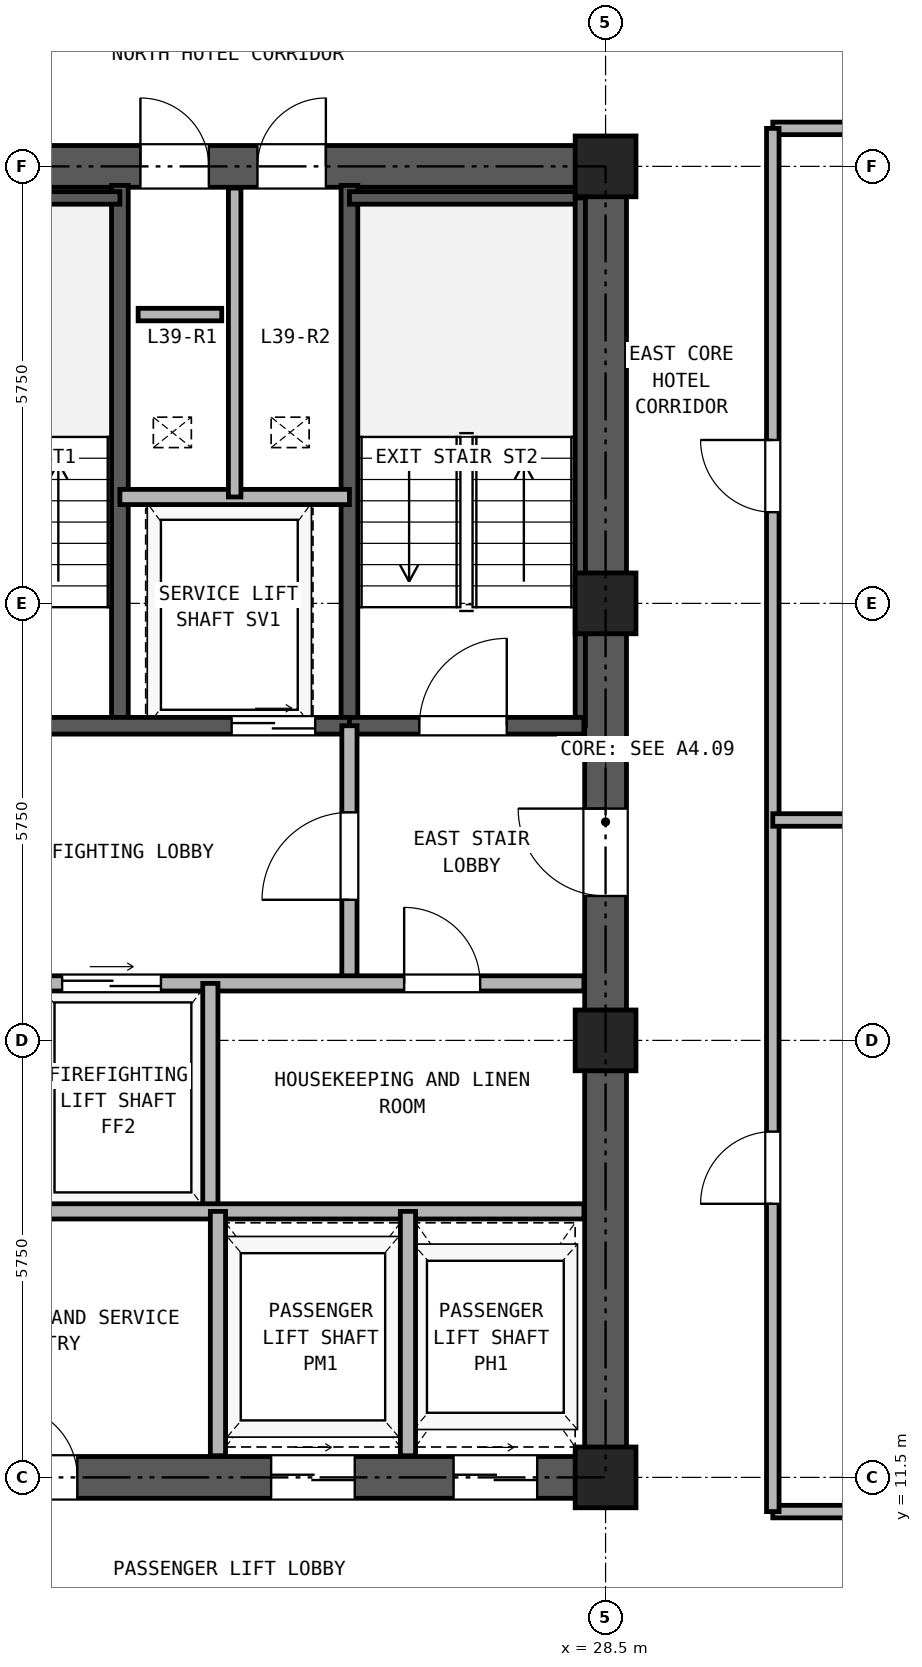
"""IFC4 building model, lengths in metres.
Left out: names, types, materials, properties, quantities, classifications, styles, units other than length and angle.
Written with IfcOpenShell. Run it as: python <this file> out.ifc"""

import sys

from ifc_helpers import new_model, si_unit, direction, frame, frame_2d, origin, origin_2d, place, context, subcontext, project, spatial, rectangle, hollow_rectangle, extrude, source, transform, mapped, element, fill, save


model = new_model("IFC4")
c1 = context("Model", 3, precision=1e-05, world=origin(), true_north=direction((0.0, 1.0)))
c2 = subcontext(c1, "Body", "Model", "MODEL_VIEW")
j1 = project(units=[si_unit("LENGTHUNIT", "METRE"), si_unit("PLANEANGLEUNIT", "RADIAN")], contexts=[c1])
p1 = place(None, origin())
s1 = spatial("IfcSite", under=j1, at=p1, CompositionType="ELEMENT")
p2 = place(p1, origin())
s2 = spatial("IfcBuilding", under=s1, at=p2, CompositionType="ELEMENT")
p3 = place(p2, frame((0.0, 0.0, 140.7)))
s3 = spatial("IfcBuildingStorey", under=s2, at=p3, CompositionType="ELEMENT", Elevation=140.7)
m1 = source(origin(), c2, "Body", "SweptSolid", [
    extrude(hollow_rectangle(XDim=0.8, YDim=0.8, WallThickness=0.045, at=origin_2d()), origin(), (0.0, 0.0, 1.0), 2.84),
])
for number, where, z_axis, x_axis in (
    (1, (28.5, 11.5, 0.0), (0.0, 0.0, 1.0), (1.0, 0.0, 0.0)),
    (2, (28.5, 17.25, 0.0), (0.0, 0.0, 1.0), (1.0, 0.0, 0.0)),
    (3, (28.5, 23.0, 0.0), (0.0, 0.0, 1.0), (1.0, 0.0, 0.0)),
    (4, (28.5, 28.75, 0.0), (0.0, 0.0, 1.0), (1.0, 0.0, 0.0)),
):
    element("IfcColumn", number, at=place(p3, frame(where, z_axis=z_axis, x_axis=x_axis)), inside=s3, PredefinedType="COLUMN", context=c2, shape_type="MappedRepresentation", body=[
        mapped(m1, transform((0.0, 0.0, 0.0), x_axis=(1.0, 0.0, 0.0), y_axis=(0.0, 1.0, 0.0), z_axis=(0.0, 0.0, 1.0), scale=1.0)),
    ])
p4 = place(p3, frame((18.225, 11.5, 0.0), z_axis=(0.0, 0.0, 1.0), x_axis=(1.0, 0.0, 0.0)))
e5 = element("IfcWall", 5, at=p4, inside=s3, PredefinedType="SHEAR", context=c2, shape_type="SweptSolid", body=[
    extrude(rectangle(XDim=10.55, YDim=0.55, at=frame_2d((5.275, 0.0))), origin(), (0.0, 0.0, 1.0), 2.84),
])
p5 = place(p4, frame((2.375, 0.0, 0.0)))
e6 = element("IfcOpeningElement", 6, at=p5, cuts=e5, PredefinedType="OPENING", context=c2, shape_type="SweptSolid", body=[
    extrude(rectangle(XDim=0.95, YDim=2.15, at=frame_2d((0.475, 1.075))), frame((0.0, 0.285, 0.0), z_axis=(0.0, -1.0, 0.0), x_axis=(1.0, 0.0, 0.0)), (0.0, 0.0, 1.0), 0.57),
])
p6 = place(p4, frame((5.875, 0.0, 0.0)))
e7 = element("IfcOpeningElement", 7, at=p6, cuts=e5, PredefinedType="OPENING", context=c2, shape_type="SweptSolid", body=[
    extrude(rectangle(XDim=1.1, YDim=2.25, at=frame_2d((0.55, 1.125))), frame((0.0, 0.285, 0.0), z_axis=(0.0, -1.0, 0.0), x_axis=(1.0, 0.0, 0.0)), (0.0, 0.0, 1.0), 0.57),
])
p7 = place(p4, frame((8.275, 0.0, 0.0)))
e8 = element("IfcOpeningElement", 8, at=p7, cuts=e5, PredefinedType="OPENING", context=c2, shape_type="SweptSolid", body=[
    extrude(rectangle(XDim=1.1, YDim=2.25, at=frame_2d((0.55, 1.125))), frame((0.0, 0.285, 0.0), z_axis=(0.0, -1.0, 0.0), x_axis=(1.0, 0.0, 0.0)), (0.0, 0.0, 1.0), 0.57),
])
p8 = place(p3, frame((18.225, 28.75, 0.0), z_axis=(0.0, 0.0, 1.0), x_axis=(1.0, 0.0, 0.0)))
e9 = element("IfcWall", 9, at=p8, inside=s3, PredefinedType="SHEAR", context=c2, shape_type="SweptSolid", body=[
    extrude(rectangle(XDim=10.55, YDim=0.55, at=frame_2d((5.275, 0.0))), origin(), (0.0, 0.0, 1.0), 2.84),
])
p9 = place(p8, frame((4.155, 0.0, 0.0)))
e10 = element("IfcOpeningElement", 10, at=p9, cuts=e9, PredefinedType="OPENING", context=c2, shape_type="SweptSolid", body=[
    extrude(rectangle(XDim=0.9, YDim=2.05, at=frame_2d((0.45, 1.025))), frame((0.0, 0.285, 0.0), z_axis=(0.0, -1.0, 0.0), x_axis=(1.0, 0.0, 0.0)), (0.0, 0.0, 1.0), 0.57),
])
p10 = place(p8, frame((5.695, 0.0, 0.0)))
e11 = element("IfcOpeningElement", 11, at=p10, cuts=e9, PredefinedType="OPENING", context=c2, shape_type="SweptSolid", body=[
    extrude(rectangle(XDim=0.9, YDim=2.05, at=frame_2d((0.45, 1.025))), frame((0.0, 0.285, 0.0), z_axis=(0.0, -1.0, 0.0), x_axis=(1.0, 0.0, 0.0)), (0.0, 0.0, 1.0), 0.57),
])
p11 = place(p3, frame((28.5, 11.775, 0.0), z_axis=(0.0, 0.0, 1.0), x_axis=(0.0, 1.0, 0.0)))
e12 = element("IfcWall", 12, at=p11, inside=s3, PredefinedType="SHEAR", context=c2, shape_type="SweptSolid", body=[
    extrude(rectangle(XDim=16.7, YDim=0.55, at=frame_2d((8.35, 0.0))), origin(), (0.0, 0.0, 1.0), 2.84),
])
p12 = place(p11, frame((7.375, 0.0, 0.0)))
e13 = element("IfcOpeningElement", 13, at=p12, cuts=e12, PredefinedType="OPENING", context=c2, shape_type="SweptSolid", body=[
    extrude(rectangle(XDim=1.15, YDim=2.2, at=frame_2d((0.575, 1.1))), frame((0.0, 0.285, 0.0), z_axis=(0.0, -1.0, 0.0), x_axis=(1.0, 0.0, 0.0)), (0.0, 0.0, 1.0), 0.57),
])
for number, where, z_axis, x_axis in (
    (14, (22.11, 21.39, 0.0), (0.0, 0.0, 1.0), (0.0, 1.0, 0.0)),
    (15, (25.13, 21.39, 0.0), (0.0, 0.0, 1.0), (0.0, 1.0, 0.0)),
):
    element("IfcWall", number, at=place(p3, frame(where, z_axis=z_axis, x_axis=x_axis)), inside=s3, PredefinedType="SOLIDWALL", context=c2, shape_type="SweptSolid", body=[
        extrude(rectangle(XDim=7.11, YDim=0.22, at=frame_2d((3.555, 0.0))), origin(), (0.0, 0.0, 1.0), 2.84),
    ])
p13 = place(p3, frame((18.785, 28.335, 0.0), z_axis=(0.0, 0.0, 1.0), x_axis=(1.0, 0.0, 0.0)))
e16 = element("IfcWall", 16, at=p13, inside=s3, PredefinedType="PARTITIONING", context=c2, shape_type="SweptSolid", body=[
    extrude(rectangle(XDim=3.325, YDim=0.165, at=frame_2d((1.663, 0.0))), origin(), (0.0, 0.0, 1.0), 2.84),
])
p14 = place(p3, frame((25.13, 28.335, 0.0), z_axis=(0.0, 0.0, 1.0), x_axis=(1.0, 0.0, 0.0)))
e17 = element("IfcWall", 17, at=p14, inside=s3, PredefinedType="PARTITIONING", context=c2, shape_type="SweptSolid", body=[
    extrude(rectangle(XDim=3.085, YDim=0.165, at=frame_2d((1.542, 0.0))), origin(), (0.0, 0.0, 1.0), 2.84),
])
p15 = place(p3, frame((28.167, 21.39, 0.0), z_axis=(0.0, 0.0, 1.0), x_axis=(0.0, 1.0, 0.0)))
e18 = element("IfcWall", 18, at=p15, inside=s3, PredefinedType="PARTITIONING", context=c2, shape_type="SweptSolid", body=[
    extrude(rectangle(XDim=6.945, YDim=0.135, at=frame_2d((3.473, 0.0))), origin(), (0.0, 0.0, 1.0), 2.84),
])
p16 = place(p3, frame((18.785, 21.39, 0.0), z_axis=(0.0, 0.0, 1.0), x_axis=(1.0, 0.0, 0.0)))
e19 = element("IfcWall", 19, at=p16, inside=s3, PredefinedType="SOLIDWALL", context=c2, shape_type="SweptSolid", body=[
    extrude(rectangle(XDim=6.345, YDim=0.22, at=frame_2d((3.172, 0.0))), origin(), (0.0, 0.0, 1.0), 2.84),
])
p17 = place(p16, frame((1.065, 0.0, 0.0)))
e20 = element("IfcOpeningElement", 20, at=p17, cuts=e19, PredefinedType="OPENING", context=c2, shape_type="SweptSolid", body=[
    extrude(rectangle(XDim=1.15, YDim=2.2, at=frame_2d((0.575, 1.1))), frame((0.0, 0.12, 0.0), z_axis=(0.0, -1.0, 0.0), x_axis=(1.0, 0.0, 0.0)), (0.0, 0.0, 1.0), 0.24),
])
p18 = place(p16, frame((4.795, 0.0, 0.0)))
e21 = element("IfcOpeningElement", 21, at=p18, cuts=e19, PredefinedType="OPENING", context=c2, shape_type="SweptSolid", body=[
    extrude(rectangle(XDim=1.1, YDim=2.25, at=frame_2d((0.55, 1.125))), frame((0.0, 0.12, 0.0), z_axis=(0.0, -1.0, 0.0), x_axis=(1.0, 0.0, 0.0)), (0.0, 0.0, 1.0), 0.24),
])
p19 = place(p3, frame((25.13, 21.39, 0.0), z_axis=(0.0, 0.0, 1.0), x_axis=(1.0, 0.0, 0.0)))
e22 = element("IfcWall", 22, at=p19, inside=s3, PredefinedType="SOLIDWALL", context=c2, shape_type="SweptSolid", body=[
    extrude(rectangle(XDim=3.085, YDim=0.22, at=frame_2d((1.542, 0.0))), origin(), (0.0, 0.0, 1.0), 2.84),
])
p20 = place(p19, frame((0.92, 0.0, 0.0)))
e23 = element("IfcOpeningElement", 23, at=p20, cuts=e22, PredefinedType="OPENING", context=c2, shape_type="SweptSolid", body=[
    extrude(rectangle(XDim=1.15, YDim=2.2, at=frame_2d((0.575, 1.1))), frame((0.0, 0.12, 0.0), z_axis=(0.0, -1.0, 0.0), x_axis=(1.0, 0.0, 0.0)), (0.0, 0.0, 1.0), 0.24),
])
p21 = place(p3, frame((22.11, 24.4, 0.0), z_axis=(0.0, 0.0, 1.0), x_axis=(1.0, 0.0, 0.0)))
e24 = element("IfcWall", 24, at=p21, inside=s3, PredefinedType="PARTITIONING", context=c2, shape_type="SweptSolid", body=[
    extrude(rectangle(XDim=3.02, YDim=0.2, at=frame_2d((1.51, 0.0))), origin(), (0.0, 0.0, 1.0), 2.84),
])
p22 = place(p3, frame((23.62, 24.4, 0.0), z_axis=(0.0, 0.0, 1.0), x_axis=(0.0, 1.0, 0.0)))
e25 = element("IfcWall", 25, at=p22, inside=s3, PredefinedType="PARTITIONING", context=c2, shape_type="SweptSolid", body=[
    extrude(rectangle(XDim=4.065, YDim=0.165, at=frame_2d((2.033, 0.0))), origin(), (0.0, 0.0, 1.0), 2.84),
])
p23 = place(p3, frame((25.13, 18.0, 0.0), z_axis=(0.0, 0.0, 1.0), x_axis=(0.0, 1.0, 0.0)))
e26 = element("IfcWall", 26, at=p23, inside=s3, PredefinedType="PARTITIONING", context=c2, shape_type="SweptSolid", body=[
    extrude(rectangle(XDim=3.39, YDim=0.2, at=frame_2d((1.695, 0.0))), origin(), (0.0, 0.0, 1.0), 2.84),
])
p24 = place(p23, frame((1.1, 0.0, 0.0)))
e27 = element("IfcOpeningElement", 27, at=p24, cuts=e26, PredefinedType="OPENING", context=c2, shape_type="SweptSolid", body=[
    extrude(rectangle(XDim=1.15, YDim=2.2, at=frame_2d((0.575, 1.1))), frame((0.0, 0.11, 0.0), z_axis=(0.0, -1.0, 0.0), x_axis=(1.0, 0.0, 0.0)), (0.0, 0.0, 1.0), 0.22),
])
p25 = place(p3, frame((18.785, 18.0, 0.0), z_axis=(0.0, 0.0, 1.0), x_axis=(1.0, 0.0, 0.0)))
e28 = element("IfcWall", 28, at=p25, inside=s3, PredefinedType="PARTITIONING", context=c2, shape_type="SweptSolid", body=[
    extrude(rectangle(XDim=9.43, YDim=0.2, at=frame_2d((4.715, 0.0))), origin(), (0.0, 0.0, 1.0), 2.84),
])
p26 = place(p25, frame((0.465, 0.0, 0.0)))
e29 = element("IfcOpeningElement", 29, at=p26, cuts=e28, PredefinedType="OPENING", context=c2, shape_type="SweptSolid", body=[
    extrude(rectangle(XDim=1.3, YDim=2.3, at=frame_2d((0.65, 1.15))), frame((0.0, 0.11, 0.0), z_axis=(0.0, -1.0, 0.0), x_axis=(1.0, 0.0, 0.0)), (0.0, 0.0, 1.0), 0.22),
])
p27 = place(p25, frame((2.565, 0.0, 0.0)))
e30 = element("IfcOpeningElement", 30, at=p27, cuts=e28, PredefinedType="OPENING", context=c2, shape_type="SweptSolid", body=[
    extrude(rectangle(XDim=1.3, YDim=2.3, at=frame_2d((0.65, 1.15))), frame((0.0, 0.11, 0.0), z_axis=(0.0, -1.0, 0.0), x_axis=(1.0, 0.0, 0.0)), (0.0, 0.0, 1.0), 0.22),
])
p28 = place(p25, frame((7.065, 0.0, 0.0)))
e31 = element("IfcOpeningElement", 31, at=p28, cuts=e28, PredefinedType="OPENING", context=c2, shape_type="SweptSolid", body=[
    extrude(rectangle(XDim=1.0, YDim=2.15, at=frame_2d((0.5, 1.075))), frame((0.0, 0.11, 0.0), z_axis=(0.0, -1.0, 0.0), x_axis=(1.0, 0.0, 0.0)), (0.0, 0.0, 1.0), 0.22),
])
p29 = place(p3, frame((23.3, 15.0, 0.0), z_axis=(0.0, 0.0, 1.0), x_axis=(0.0, 1.0, 0.0)))
e32 = element("IfcWall", 32, at=p29, inside=s3, PredefinedType="PARTITIONING", context=c2, shape_type="SweptSolid", body=[
    extrude(rectangle(XDim=3.0, YDim=0.2, at=frame_2d((1.5, 0.0))), origin(), (0.0, 0.0, 1.0), 2.84),
])
p30 = place(p3, frame((18.785, 15.0, 0.0), z_axis=(0.0, 0.0, 1.0), x_axis=(1.0, 0.0, 0.0)))
e33 = element("IfcWall", 33, at=p30, inside=s3, PredefinedType="PARTITIONING", context=c2, shape_type="SweptSolid", body=[
    extrude(rectangle(XDim=9.43, YDim=0.2, at=frame_2d((4.715, 0.0))), origin(), (0.0, 0.0, 1.0), 2.84),
])
for number, where, z_axis, x_axis in (
    (34, (23.4, 11.785, 0.0), (0.0, 0.0, 1.0), (0.0, 1.0, 0.0)),
    (35, (25.9, 11.785, 0.0), (0.0, 0.0, 1.0), (0.0, 1.0, 0.0)),
):
    element("IfcWall", number, at=place(p3, frame(where, z_axis=z_axis, x_axis=x_axis)), inside=s3, PredefinedType="PARTITIONING", context=c2, shape_type="SweptSolid", body=[
        extrude(rectangle(XDim=3.215, YDim=0.2, at=frame_2d((1.607, 0.0))), origin(), (0.0, 0.0, 1.0), 2.84),
    ])
for number, where, z_axis, x_axis in (
    (36, (30.7, 11.05, 0.0), (0.0, 0.0, 1.0), (1.0, 0.0, 0.0)),
    (37, (30.7, 29.25, 0.0), (0.0, 0.0, 1.0), (1.0, 0.0, 0.0)),
):
    element("IfcWall", number, at=place(p3, frame(where, z_axis=z_axis, x_axis=x_axis)), inside=s3, PredefinedType="PARTITIONING", context=c2, shape_type="SweptSolid", body=[
        extrude(rectangle(XDim=7.5, YDim=0.165, at=frame_2d((3.75, 0.0))), origin(), (0.0, 0.0, 1.0), 2.84),
    ])
p31 = place(p3, frame((30.7, 11.05, 0.0), z_axis=(0.0, 0.0, 1.0), x_axis=(0.0, 1.0, 0.0)))
e38 = element("IfcWall", 38, at=p31, inside=s3, PredefinedType="PARTITIONING", context=c2, shape_type="SweptSolid", body=[
    extrude(rectangle(XDim=18.2, YDim=0.165, at=frame_2d((9.1, 0.0))), origin(), (0.0, 0.0, 1.0), 2.84),
])
p32 = place(p31, frame((4.05, 0.0, 0.0)))
e39 = element("IfcOpeningElement", 39, at=p32, cuts=e38, PredefinedType="OPENING", context=c2, shape_type="SweptSolid", body=[
    extrude(rectangle(XDim=0.95, YDim=2.15, at=frame_2d((0.475, 1.075))), frame((0.0, 0.093, 0.0), z_axis=(0.0, -1.0, 0.0), x_axis=(1.0, 0.0, 0.0)), (0.0, 0.0, 1.0), 0.185),
])
p33 = place(p31, frame((13.15, 0.0, 0.0)))
e40 = element("IfcOpeningElement", 40, at=p33, cuts=e38, PredefinedType="OPENING", context=c2, shape_type="SweptSolid", body=[
    extrude(rectangle(XDim=0.95, YDim=2.15, at=frame_2d((0.475, 1.075))), frame((0.0, 0.093, 0.0), z_axis=(0.0, -1.0, 0.0), x_axis=(1.0, 0.0, 0.0)), (0.0, 0.0, 1.0), 0.185),
])
p34 = place(p3, frame((30.7, 20.15, 0.0), z_axis=(0.0, 0.0, 1.0), x_axis=(1.0, 0.0, 0.0)))
e41 = element("IfcWall", 41, at=p34, inside=s3, PredefinedType="PARTITIONING", context=c2, shape_type="SweptSolid", body=[
    extrude(rectangle(XDim=16.14, YDim=0.165, at=frame_2d((8.07, 0.0))), origin(), (0.0, 0.0, 1.0), 2.473),
])
p35 = place(p3, frame((22.35, 26.8, 0.0), z_axis=(0.0, 0.0, 1.0), x_axis=(1.0, 0.0, 0.0)))
e42 = element("IfcWall", 42, at=p35, inside=s3, PredefinedType="PARTITIONING", context=c2, shape_type="SweptSolid", body=[
    extrude(rectangle(XDim=1.1, YDim=0.165, at=frame_2d((0.55, 0.0))), origin(), (0.0, 0.0, 1.0), 2.84),
])
p36 = place(p20, frame((1.15, 0.0, 0.0), z_axis=(0.0, 0.0, 1.0), x_axis=(-1.0, 0.0, 0.0)))
e43 = element("IfcDoor", 43, at=p36, inside=s3, OperationType="SINGLE_SWING_RIGHT", PredefinedType="DOOR", context=c2, shape_type="SweptSolid", body=[
    extrude(rectangle(XDim=1.15, YDim=2.2, at=frame_2d((0.575, 1.1))), frame((0.0, 0.025, 0.0), z_axis=(0.0, -1.0, 0.0), x_axis=(1.0, 0.0, 0.0)), (0.0, 0.0, 1.0), 0.05),
])
fill(e23, e43)
p37 = place(p18, frame((1.1, 0.0, 0.0), z_axis=(0.0, 0.0, 1.0), x_axis=(-1.0, 0.0, 0.0)))
e44 = element("IfcDoor", 44, at=p37, inside=s3, OperationType="DOUBLE_DOOR_SLIDING", PredefinedType="DOOR", context=c2, shape_type="SweptSolid", body=[
    extrude(rectangle(XDim=1.1, YDim=2.25, at=frame_2d((0.55, 1.125))), frame((0.0, 0.025, 0.0), z_axis=(0.0, -1.0, 0.0), x_axis=(1.0, 0.0, 0.0)), (0.0, 0.0, 1.0), 0.05),
])
fill(e21, e44)
p38 = place(p24, origin())
e45 = element("IfcDoor", 45, at=p38, inside=s3, OperationType="SINGLE_SWING_LEFT", PredefinedType="DOOR", context=c2, shape_type="SweptSolid", body=[
    extrude(rectangle(XDim=1.15, YDim=2.2, at=frame_2d((0.575, 1.1))), frame((0.0, 0.025, 0.0), z_axis=(0.0, -1.0, 0.0), x_axis=(1.0, 0.0, 0.0)), (0.0, 0.0, 1.0), 0.05),
])
fill(e27, e45)
p39 = place(p27, origin())
e46 = element("IfcDoor", 46, at=p39, inside=s3, OperationType="DOUBLE_DOOR_SLIDING", PredefinedType="DOOR", context=c2, shape_type="SweptSolid", body=[
    extrude(rectangle(XDim=1.3, YDim=2.3, at=frame_2d((0.65, 1.15))), frame((0.0, 0.025, 0.0), z_axis=(0.0, -1.0, 0.0), x_axis=(1.0, 0.0, 0.0)), (0.0, 0.0, 1.0), 0.05),
])
fill(e30, e46)
p40 = place(p28, frame((1.0, 0.0, 0.0), z_axis=(0.0, 0.0, 1.0), x_axis=(-1.0, 0.0, 0.0)))
e47 = element("IfcDoor", 47, at=p40, inside=s3, OperationType="SINGLE_SWING_LEFT", PredefinedType="DOOR", context=c2, shape_type="SweptSolid", body=[
    extrude(rectangle(XDim=1.0, YDim=2.15, at=frame_2d((0.5, 1.075))), frame((0.0, 0.025, 0.0), z_axis=(0.0, -1.0, 0.0), x_axis=(1.0, 0.0, 0.0)), (0.0, 0.0, 1.0), 0.05),
])
fill(e31, e47)
p41 = place(p12, origin())
e48 = element("IfcDoor", 48, at=p41, inside=s3, OperationType="SINGLE_SWING_RIGHT", PredefinedType="DOOR", context=c2, shape_type="SweptSolid", body=[
    extrude(rectangle(XDim=1.15, YDim=2.2, at=frame_2d((0.575, 1.1))), frame((0.0, 0.025, 0.0), z_axis=(0.0, -1.0, 0.0), x_axis=(1.0, 0.0, 0.0)), (0.0, 0.0, 1.0), 0.05),
])
fill(e13, e48)
p42 = place(p9, origin())
e49 = element("IfcDoor", 49, at=p42, inside=s3, OperationType="SINGLE_SWING_LEFT", PredefinedType="DOOR", context=c2, shape_type="SweptSolid", body=[
    extrude(rectangle(XDim=0.9, YDim=2.05, at=frame_2d((0.45, 1.025))), frame((0.0, 0.025, 0.0), z_axis=(0.0, -1.0, 0.0), x_axis=(1.0, 0.0, 0.0)), (0.0, 0.0, 1.0), 0.05),
])
fill(e10, e49)
p43 = place(p10, origin())
e50 = element("IfcDoor", 50, at=p43, inside=s3, OperationType="SINGLE_SWING_RIGHT", PredefinedType="DOOR", context=c2, shape_type="SweptSolid", body=[
    extrude(rectangle(XDim=0.9, YDim=2.05, at=frame_2d((0.45, 1.025))), frame((0.0, 0.025, 0.0), z_axis=(0.0, -1.0, 0.0), x_axis=(1.0, 0.0, 0.0)), (0.0, 0.0, 1.0), 0.05),
])
fill(e11, e50)
p44 = place(p5, frame((0.95, 0.0, 0.0), z_axis=(0.0, 0.0, 1.0), x_axis=(-1.0, 0.0, 0.0)))
e51 = element("IfcDoor", 51, at=p44, inside=s3, OperationType="SINGLE_SWING_LEFT", PredefinedType="DOOR", context=c2, shape_type="SweptSolid", body=[
    extrude(rectangle(XDim=0.95, YDim=2.15, at=frame_2d((0.475, 1.075))), frame((0.0, 0.025, 0.0), z_axis=(0.0, -1.0, 0.0), x_axis=(1.0, 0.0, 0.0)), (0.0, 0.0, 1.0), 0.05),
])
fill(e6, e51)
p45 = place(p6, frame((1.1, 0.0, 0.0), z_axis=(0.0, 0.0, 1.0), x_axis=(-1.0, 0.0, 0.0)))
e52 = element("IfcDoor", 52, at=p45, inside=s3, OperationType="DOUBLE_DOOR_SLIDING", PredefinedType="DOOR", context=c2, shape_type="SweptSolid", body=[
    extrude(rectangle(XDim=1.1, YDim=2.25, at=frame_2d((0.55, 1.125))), frame((0.0, 0.025, 0.0), z_axis=(0.0, -1.0, 0.0), x_axis=(1.0, 0.0, 0.0)), (0.0, 0.0, 1.0), 0.05),
])
fill(e7, e52)
p46 = place(p7, frame((1.1, 0.0, 0.0), z_axis=(0.0, 0.0, 1.0), x_axis=(-1.0, 0.0, 0.0)))
e53 = element("IfcDoor", 53, at=p46, inside=s3, OperationType="DOUBLE_DOOR_SLIDING", PredefinedType="DOOR", context=c2, shape_type="SweptSolid", body=[
    extrude(rectangle(XDim=1.1, YDim=2.25, at=frame_2d((0.55, 1.125))), frame((0.0, 0.025, 0.0), z_axis=(0.0, -1.0, 0.0), x_axis=(1.0, 0.0, 0.0)), (0.0, 0.0, 1.0), 0.05),
])
fill(e8, e53)
p47 = place(p32, origin())
e54 = element("IfcDoor", 54, at=p47, inside=s3, OperationType="SINGLE_SWING_LEFT", PredefinedType="DOOR", context=c2, shape_type="SweptSolid", body=[
    extrude(rectangle(XDim=0.95, YDim=2.15, at=frame_2d((0.475, 1.075))), frame((0.0, 0.025, 0.0), z_axis=(0.0, -1.0, 0.0), x_axis=(1.0, 0.0, 0.0)), (0.0, 0.0, 1.0), 0.05),
])
fill(e39, e54)
p48 = place(p33, origin())
e55 = element("IfcDoor", 55, at=p48, inside=s3, OperationType="SINGLE_SWING_RIGHT", PredefinedType="DOOR", context=c2, shape_type="SweptSolid", body=[
    extrude(rectangle(XDim=0.95, YDim=2.15, at=frame_2d((0.475, 1.075))), frame((0.0, 0.025, 0.0), z_axis=(0.0, -1.0, 0.0), x_axis=(1.0, 0.0, 0.0)), (0.0, 0.0, 1.0), 0.05),
])
fill(e40, e55)
save(model, sys.argv[1])
